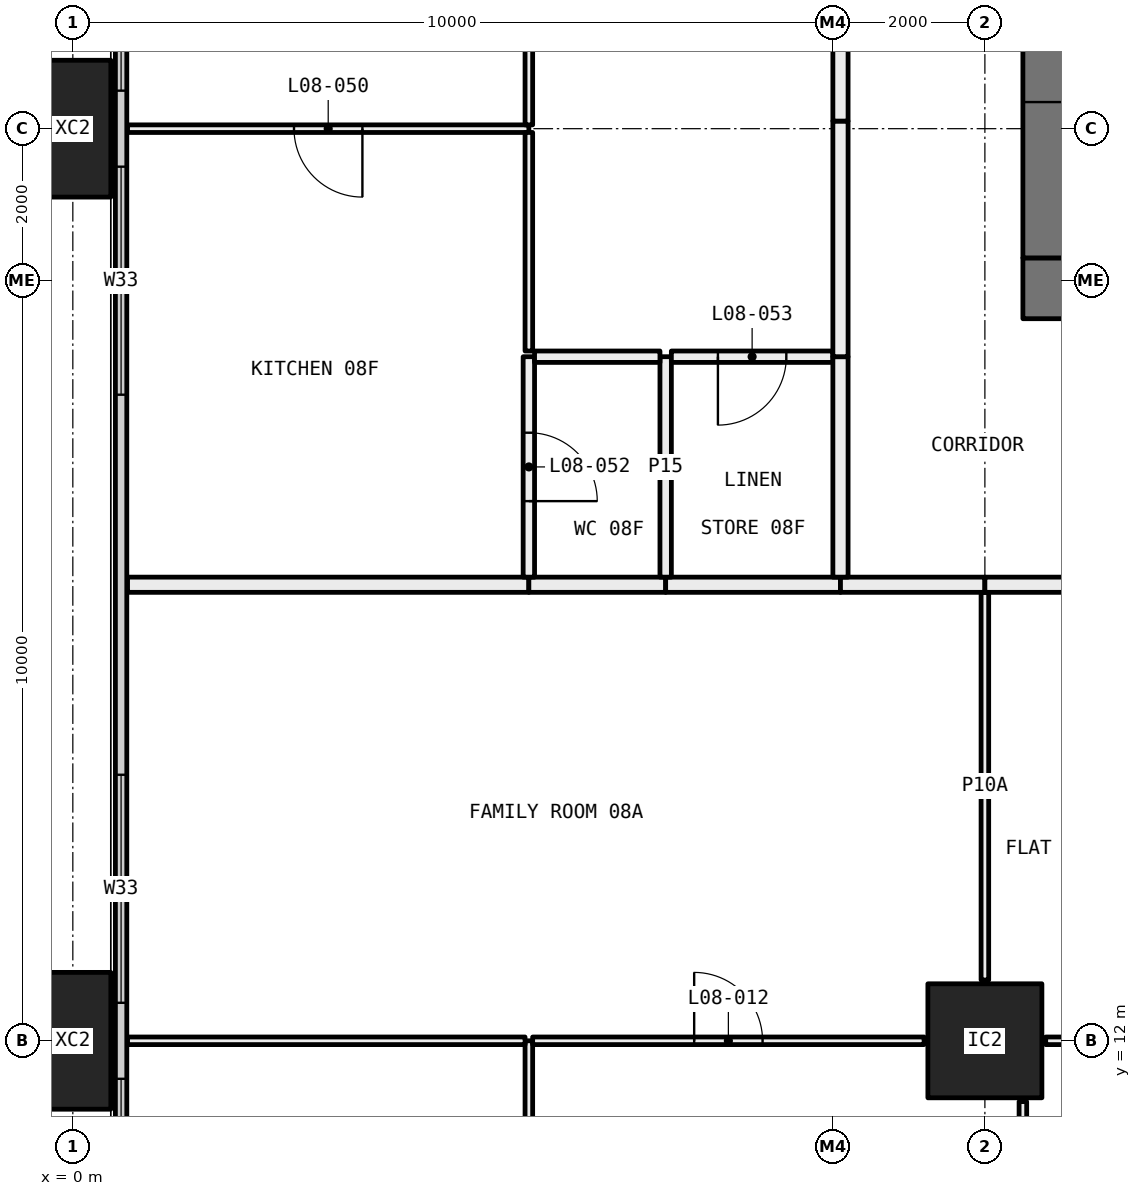
"""IFC4 building model, lengths in metres.
Left out: names, types, materials, properties, quantities, classifications, styles, units other than length and angle.
Written with IfcOpenShell. Run it as: python <this file> out.ifc"""

import sys

from ifc_helpers import new_model, si_unit, direction, frame, frame_2d, origin, origin_2d, place, context, subcontext, project, spatial, rectangle, hollow_rectangle, extrude, element, fill, save


model = new_model("IFC4")
c1 = context("Model", 3, precision=1e-05, world=origin(), true_north=direction((0.0, 1.0)))
c2 = subcontext(c1, "Body", "Model", "MODEL_VIEW")
j1 = project(units=[si_unit("LENGTHUNIT", "METRE"), si_unit("PLANEANGLEUNIT", "RADIAN")], contexts=[c1])
p1 = place(None, origin())
s1 = spatial("IfcSite", under=j1, at=p1, CompositionType="ELEMENT")
p2 = place(p1, origin())
s2 = spatial("IfcBuilding", under=s1, at=p2, CompositionType="ELEMENT")
p3 = place(p2, frame((0.0, 0.0, 40.35)))
s3 = spatial("IfcBuildingStorey", under=s2, at=p3, CompositionType="ELEMENT", Elevation=40.35)
for number, where, z_axis, x_axis in (
    (1, (0.0, 12.0, -0.4), (0.0, 0.0, 1.0), (0.0, 1.0, 0.0)),
    (2, (0.0, 24.0, -0.4), (0.0, 0.0, 1.0), (0.0, 1.0, 0.0)),
):
    element("IfcColumn", number, at=place(p3, frame(where, z_axis=z_axis, x_axis=x_axis)), inside=s3, PredefinedType="COLUMN", context=c2, shape_type="SweptSolid", body=[
        extrude(hollow_rectangle(XDim=1.8, YDim=1.0, WallThickness=0.07, at=origin_2d()), origin(), (0.0, 0.0, 1.0), 3.45),
    ])
p4 = place(p3, frame((12.0, 12.0, 0.0), z_axis=(0.0, 0.0, 1.0), x_axis=(1.0, 0.0, 0.0)))
e3 = element("IfcColumn", 3, at=p4, inside=s3, PredefinedType="COLUMN", context=c2, shape_type="SweptSolid", body=[
    extrude(hollow_rectangle(XDim=1.5, YDim=1.5, WallThickness=0.065, at=origin_2d()), origin(), (0.0, 0.0, 1.0), 3.05),
])
p5 = place(p3, frame((0.635, 6.71, 0.0), z_axis=(0.0, 0.0, 1.0), x_axis=(0.0, 1.0, 0.0)))
e4 = element("IfcWall", 4, at=p5, inside=s3, PredefinedType="ELEMENTEDWALL", context=c2, shape_type="SweptSolid", body=[
    extrude(rectangle(XDim=34.58, YDim=0.15, at=frame_2d((17.29, 0.0))), origin(), (0.0, 0.0, 1.0), 3.05),
])
p6 = place(p5, frame((0.29, 0.0, 0.45)))
e5 = element("IfcOpeningElement", 5, at=p6, cuts=e4, PredefinedType="OPENING", context=c2, shape_type="SweptSolid", body=[
    extrude(rectangle(XDim=4.5, YDim=2.55, at=frame_2d((2.25, 1.275))), frame((0.0, 0.085, 0.0), z_axis=(0.0, -1.0, 0.0), x_axis=(1.0, 0.0, 0.0)), (0.0, 0.0, 1.0), 0.17),
])
p7 = place(p5, frame((5.79, 0.0, 0.45)))
e6 = element("IfcOpeningElement", 6, at=p7, cuts=e4, PredefinedType="OPENING", context=c2, shape_type="SweptSolid", body=[
    extrude(rectangle(XDim=3.0, YDim=2.55, at=frame_2d((1.5, 1.275))), frame((0.0, 0.085, 0.0), z_axis=(0.0, -1.0, 0.0), x_axis=(1.0, 0.0, 0.0)), (0.0, 0.0, 1.0), 0.17),
])
p8 = place(p5, frame((13.79, 0.0, 0.45)))
e7 = element("IfcOpeningElement", 7, at=p8, cuts=e4, PredefinedType="OPENING", context=c2, shape_type="SweptSolid", body=[
    extrude(rectangle(XDim=3.0, YDim=2.55, at=frame_2d((1.5, 1.275))), frame((0.0, 0.085, 0.0), z_axis=(0.0, -1.0, 0.0), x_axis=(1.0, 0.0, 0.0)), (0.0, 0.0, 1.0), 0.17),
])
p9 = place(p5, frame((17.79, 0.0, 0.45)))
e8 = element("IfcOpeningElement", 8, at=p9, cuts=e4, PredefinedType="OPENING", context=c2, shape_type="SweptSolid", body=[
    extrude(rectangle(XDim=3.0, YDim=2.55, at=frame_2d((1.5, 1.275))), frame((0.0, 0.085, 0.0), z_axis=(0.0, -1.0, 0.0), x_axis=(1.0, 0.0, 0.0)), (0.0, 0.0, 1.0), 0.17),
])
p10 = place(p5, frame((26.79, 0.0, 0.45)))
e9 = element("IfcOpeningElement", 9, at=p10, cuts=e4, PredefinedType="OPENING", context=c2, shape_type="SweptSolid", body=[
    extrude(rectangle(XDim=2.0, YDim=2.55, at=frame_2d((1.0, 1.275))), frame((0.0, 0.085, 0.0), z_axis=(0.0, -1.0, 0.0), x_axis=(1.0, 0.0, 0.0)), (0.0, 0.0, 1.0), 0.17),
])
p11 = place(p5, frame((29.79, 0.0, 0.45)))
e10 = element("IfcOpeningElement", 10, at=p11, cuts=e4, PredefinedType="OPENING", context=c2, shape_type="SweptSolid", body=[
    extrude(rectangle(XDim=4.5, YDim=2.55, at=frame_2d((2.25, 1.275))), frame((0.0, 0.085, 0.0), z_axis=(0.0, -1.0, 0.0), x_axis=(1.0, 0.0, 0.0)), (0.0, 0.0, 1.0), 0.17),
])
p12 = place(p3, frame((6.0, 6.72, 0.0), z_axis=(0.0, 0.0, 1.0), x_axis=(0.0, 1.0, 0.0)))
e11 = element("IfcWall", 11, at=p12, inside=s3, PredefinedType="PARTITIONING", context=c2, shape_type="SweptSolid", body=[
    extrude(rectangle(XDim=5.28, YDim=0.1, at=frame_2d((2.64, 0.0))), origin(), (0.0, 0.0, 1.0), 2.45),
])
p13 = place(p12, frame((2.19, 0.0, 0.0)))
e12 = element("IfcOpeningElement", 12, at=p13, cuts=e11, PredefinedType="OPENING", context=c2, shape_type="SweptSolid", body=[
    extrude(rectangle(XDim=0.9, YDim=2.1, at=frame_2d((0.45, 1.05))), frame((0.0, 0.06, 0.0), z_axis=(0.0, -1.0, 0.0), x_axis=(1.0, 0.0, 0.0)), (0.0, 0.0, 1.0), 0.12),
])
p14 = place(p3, frame((5.95, 12.0, 0.0), z_axis=(0.0, 0.0, 1.0), x_axis=(-1.0, 0.0, 0.0)))
e13 = element("IfcWall", 13, at=p14, inside=s3, PredefinedType="PARTITIONING", context=c2, shape_type="SweptSolid", body=[
    extrude(rectangle(XDim=5.23, YDim=0.1, at=frame_2d((2.615, 0.0))), origin(), (0.0, 0.0, 1.0), 2.45),
])
p15 = place(p3, frame((12.5, 6.05, 0.0), z_axis=(0.0, 0.0, 1.0), x_axis=(0.0, 1.0, 0.0)))
e14 = element("IfcWall", 14, at=p15, inside=s3, PredefinedType="PARTITIONING", context=c2, shape_type="SweptSolid", body=[
    extrude(rectangle(XDim=5.15, YDim=0.1, at=frame_2d((2.575, 0.0))), origin(), (0.0, 0.0, 1.0), 3.05),
])
p16 = place(p15, frame((2.125, 0.0, 0.0)))
e15 = element("IfcOpeningElement", 15, at=p16, cuts=e14, PredefinedType="OPENING", context=c2, shape_type="SweptSolid", body=[
    extrude(rectangle(XDim=0.9, YDim=2.1, at=frame_2d((0.45, 1.05))), frame((0.0, 0.06, 0.0), z_axis=(0.0, -1.0, 0.0), x_axis=(1.0, 0.0, 0.0)), (0.0, 0.0, 1.0), 0.12),
])
p17 = place(p3, frame((11.2, 12.0, 0.0), z_axis=(0.0, 0.0, 1.0), x_axis=(-1.0, 0.0, 0.0)))
e16 = element("IfcWall", 16, at=p17, inside=s3, PredefinedType="PARTITIONING", context=c2, shape_type="SweptSolid", body=[
    extrude(rectangle(XDim=5.15, YDim=0.1, at=frame_2d((2.575, 0.0))), origin(), (0.0, 0.0, 1.0), 2.45),
])
p18 = place(p17, frame((2.125, 0.0, 0.0)))
e17 = element("IfcOpeningElement", 17, at=p18, cuts=e16, PredefinedType="OPENING", context=c2, shape_type="SweptSolid", body=[
    extrude(rectangle(XDim=0.9, YDim=2.1, at=frame_2d((0.45, 1.05))), frame((0.0, 0.06, 0.0), z_axis=(0.0, -1.0, 0.0), x_axis=(1.0, 0.0, 0.0)), (0.0, 0.0, 1.0), 0.12),
])
p19 = place(p3, frame((16.5, 12.0, 0.0), z_axis=(0.0, 0.0, 1.0), x_axis=(-1.0, 0.0, 0.0)))
e18 = element("IfcWall", 18, at=p19, inside=s3, PredefinedType="PARTITIONING", context=c2, shape_type="SweptSolid", body=[
    extrude(rectangle(XDim=3.7, YDim=0.1, at=frame_2d((1.85, 0.0))), origin(), (0.0, 0.0, 1.0), 2.45),
])
p20 = place(p19, frame((1.4, 0.0, 0.0)))
e19 = element("IfcOpeningElement", 19, at=p20, cuts=e18, PredefinedType="OPENING", context=c2, shape_type="SweptSolid", body=[
    extrude(rectangle(XDim=0.9, YDim=2.1, at=frame_2d((0.45, 1.05))), frame((0.0, 0.06, 0.0), z_axis=(0.0, -1.0, 0.0), x_axis=(1.0, 0.0, 0.0)), (0.0, 0.0, 1.0), 0.12),
])
p21 = place(p3, frame((12.0, 12.8, 0.0), z_axis=(0.0, 0.0, 1.0), x_axis=(0.0, 1.0, 0.0)))
e20 = element("IfcWall", 20, at=p21, inside=s3, PredefinedType="PARTITIONING", context=c2, shape_type="SweptSolid", body=[
    extrude(rectangle(XDim=5.1, YDim=0.1, at=frame_2d((2.55, 0.0))), origin(), (0.0, 0.0, 1.0), 3.05),
])
p22 = place(p3, frame((6.0, 18.0, 0.0), z_axis=(0.0, 0.0, 1.0), x_axis=(-1.0, 0.0, 0.0)))
e21 = element("IfcWall", 21, at=p22, inside=s3, PredefinedType="PARTITIONING", context=c2, shape_type="SweptSolid", body=[
    extrude(rectangle(XDim=5.28, YDim=0.2, at=frame_2d((2.64, 0.0))), origin(), (0.0, 0.0, 1.0), 3.05),
])
p23 = place(p3, frame((7.8, 18.0, 0.0), z_axis=(0.0, 0.0, 1.0), x_axis=(-1.0, 0.0, 0.0)))
e22 = element("IfcWall", 22, at=p23, inside=s3, PredefinedType="PARTITIONING", context=c2, shape_type="SweptSolid", body=[
    extrude(rectangle(XDim=1.8, YDim=0.2, at=frame_2d((0.9, 0.0))), origin(), (0.0, 0.0, 1.0), 3.05),
])
p24 = place(p3, frame((10.1, 18.0, 0.0), z_axis=(0.0, 0.0, 1.0), x_axis=(-1.0, 0.0, 0.0)))
e23 = element("IfcWall", 23, at=p24, inside=s3, PredefinedType="PARTITIONING", context=c2, shape_type="SweptSolid", body=[
    extrude(rectangle(XDim=2.3, YDim=0.2, at=frame_2d((1.15, 0.0))), origin(), (0.0, 0.0, 1.0), 3.05),
])
p25 = place(p3, frame((12.0, 18.0, 0.0), z_axis=(0.0, 0.0, 1.0), x_axis=(-1.0, 0.0, 0.0)))
e24 = element("IfcWall", 24, at=p25, inside=s3, PredefinedType="PARTITIONING", context=c2, shape_type="SweptSolid", body=[
    extrude(rectangle(XDim=1.9, YDim=0.2, at=frame_2d((0.95, 0.0))), origin(), (0.0, 0.0, 1.0), 3.05),
])
p26 = place(p3, frame((16.5, 18.0, 0.0), z_axis=(0.0, 0.0, 1.0), x_axis=(-1.0, 0.0, 0.0)))
e25 = element("IfcWall", 25, at=p26, inside=s3, PredefinedType="PARTITIONING", context=c2, shape_type="SweptSolid", body=[
    extrude(rectangle(XDim=4.5, YDim=0.2, at=frame_2d((2.25, 0.0))), origin(), (0.0, 0.0, 1.0), 3.05),
])
p27 = place(p26, frame((1.75, 0.0, 0.0)))
e26 = element("IfcOpeningElement", 26, at=p27, cuts=e25, PredefinedType="OPENING", context=c2, shape_type="SweptSolid", body=[
    extrude(rectangle(XDim=1.0, YDim=2.1, at=frame_2d((0.5, 1.05))), frame((0.0, 0.11, 0.0), z_axis=(0.0, -1.0, 0.0), x_axis=(1.0, 0.0, 0.0)), (0.0, 0.0, 1.0), 0.22),
])
p28 = place(p3, frame((6.0, 24.0, 0.0), z_axis=(0.0, 0.0, 1.0), x_axis=(-1.0, 0.0, 0.0)))
e27 = element("IfcWall", 27, at=p28, inside=s3, PredefinedType="PARTITIONING", context=c2, shape_type="SweptSolid", body=[
    extrude(rectangle(XDim=5.28, YDim=0.1, at=frame_2d((2.64, 0.0))), origin(), (0.0, 0.0, 1.0), 2.45),
])
p29 = place(p28, frame((2.19, 0.0, 0.0)))
e28 = element("IfcOpeningElement", 28, at=p29, cuts=e27, PredefinedType="OPENING", context=c2, shape_type="SweptSolid", body=[
    extrude(rectangle(XDim=0.9, YDim=2.1, at=frame_2d((0.45, 1.05))), frame((0.0, 0.06, 0.0), z_axis=(0.0, -1.0, 0.0), x_axis=(1.0, 0.0, 0.0)), (0.0, 0.0, 1.0), 0.12),
])
p30 = place(p3, frame((6.0, 18.1, 0.0), z_axis=(0.0, 0.0, 1.0), x_axis=(0.0, 1.0, 0.0)))
e29 = element("IfcWall", 29, at=p30, inside=s3, PredefinedType="PARTITIONING", context=c2, shape_type="SweptSolid", body=[
    extrude(rectangle(XDim=2.9, YDim=0.15, at=frame_2d((1.45, 0.0))), origin(), (0.0, 0.0, 1.0), 3.05),
])
p31 = place(p30, frame((1.0, 0.0, 0.0)))
e30 = element("IfcOpeningElement", 30, at=p31, cuts=e29, PredefinedType="OPENING", context=c2, shape_type="SweptSolid", body=[
    extrude(rectangle(XDim=0.9, YDim=2.1, at=frame_2d((0.45, 1.05))), frame((0.0, 0.085, 0.0), z_axis=(0.0, -1.0, 0.0), x_axis=(1.0, 0.0, 0.0)), (0.0, 0.0, 1.0), 0.17),
])
p32 = place(p3, frame((6.0, 21.075, 0.0), z_axis=(0.0, 0.0, 1.0), x_axis=(0.0, 1.0, 0.0)))
e31 = element("IfcWall", 31, at=p32, inside=s3, PredefinedType="PARTITIONING", context=c2, shape_type="SweptSolid", body=[
    extrude(rectangle(XDim=2.875, YDim=0.1, at=frame_2d((1.438, 0.0))), origin(), (0.0, 0.0, 1.0), 2.45),
])
p33 = place(p3, frame((6.0, 24.05, 0.0), z_axis=(0.0, 0.0, 1.0), x_axis=(0.0, 1.0, 0.0)))
e32 = element("IfcWall", 32, at=p33, inside=s3, PredefinedType="PARTITIONING", context=c2, shape_type="SweptSolid", body=[
    extrude(rectangle(XDim=8.95, YDim=0.1, at=frame_2d((4.475, 0.0))), origin(), (0.0, 0.0, 1.0), 2.45),
])
p34 = place(p3, frame((7.8, 18.1, 0.0), z_axis=(0.0, 0.0, 1.0), x_axis=(0.0, 1.0, 0.0)))
e33 = element("IfcWall", 33, at=p34, inside=s3, PredefinedType="PARTITIONING", context=c2, shape_type="SweptSolid", body=[
    extrude(rectangle(XDim=2.9, YDim=0.15, at=frame_2d((1.45, 0.0))), origin(), (0.0, 0.0, 1.0), 3.05),
])
p35 = place(p3, frame((7.725, 21.0, 0.0), z_axis=(0.0, 0.0, 1.0), x_axis=(-1.0, 0.0, 0.0)))
e34 = element("IfcWall", 34, at=p35, inside=s3, PredefinedType="PARTITIONING", context=c2, shape_type="SweptSolid", body=[
    extrude(rectangle(XDim=1.65, YDim=0.15, at=frame_2d((0.825, 0.0))), origin(), (0.0, 0.0, 1.0), 3.05),
])
p36 = place(p3, frame((10.0, 21.0, 0.0), z_axis=(0.0, 0.0, 1.0), x_axis=(-1.0, 0.0, 0.0)))
e35 = element("IfcWall", 35, at=p36, inside=s3, PredefinedType="PARTITIONING", context=c2, shape_type="SweptSolid", body=[
    extrude(rectangle(XDim=2.125, YDim=0.15, at=frame_2d((1.062, 0.0))), origin(), (0.0, 0.0, 1.0), 3.05),
])
p37 = place(p36, frame((0.613, 0.0, 0.0)))
e36 = element("IfcOpeningElement", 36, at=p37, cuts=e35, PredefinedType="OPENING", context=c2, shape_type="SweptSolid", body=[
    extrude(rectangle(XDim=0.9, YDim=2.1, at=frame_2d((0.45, 1.05))), frame((0.0, 0.085, 0.0), z_axis=(0.0, -1.0, 0.0), x_axis=(1.0, 0.0, 0.0)), (0.0, 0.0, 1.0), 0.17),
])
p38 = place(p3, frame((10.1, 18.1, 0.0), z_axis=(0.0, 0.0, 1.0), x_axis=(0.0, 1.0, 0.0)))
e37 = element("IfcWall", 37, at=p38, inside=s3, PredefinedType="PARTITIONING", context=c2, shape_type="SweptSolid", body=[
    extrude(rectangle(XDim=2.9, YDim=0.2, at=frame_2d((1.45, 0.0))), origin(), (0.0, 0.0, 1.0), 3.05),
])
p39 = place(p3, frame((10.1, 21.0, 0.0), z_axis=(0.0, 0.0, 1.0), x_axis=(0.0, 1.0, 0.0)))
e38 = element("IfcWall", 38, at=p39, inside=s3, PredefinedType="PARTITIONING", context=c2, shape_type="SweptSolid", body=[
    extrude(rectangle(XDim=3.1, YDim=0.2, at=frame_2d((1.55, 0.0))), origin(), (0.0, 0.0, 1.0), 2.45),
])
p40 = place(p3, frame((10.1, 24.1, 0.0), z_axis=(0.0, 0.0, 1.0), x_axis=(0.0, 1.0, 0.0)))
e39 = element("IfcWall", 39, at=p40, inside=s3, PredefinedType="PARTITIONING", context=c2, shape_type="SweptSolid", body=[
    extrude(rectangle(XDim=8.9, YDim=0.2, at=frame_2d((4.45, 0.0))), origin(), (0.0, 0.0, 1.0), 3.05),
])
p41 = place(p3, frame((12.5, 21.9, 0.0), z_axis=(0.0, 0.0, 1.0), x_axis=(1.0, 0.0, 0.0)))
e40 = element("IfcWall", 40, at=p41, inside=s3, PredefinedType="SHEAR", context=c2, shape_type="SweptSolid", body=[
    extrude(rectangle(XDim=11.0, YDim=0.8, at=frame_2d((5.5, 0.0))), origin(), (0.0, 0.0, 1.0), 3.05),
])
p42 = place(p3, frame((12.9, 22.3, 0.0), z_axis=(0.0, 0.0, 1.0), x_axis=(0.0, 1.0, 0.0)))
e41 = element("IfcWall", 41, at=p42, inside=s3, PredefinedType="SHEAR", context=c2, shape_type="SweptSolid", body=[
    extrude(rectangle(XDim=15.4, YDim=0.8, at=frame_2d((7.7, 0.0))), origin(), (0.0, 0.0, 1.0), 3.05),
])
p43 = place(p42, frame((8.15, 0.0, 0.0)))
e42 = element("IfcOpeningElement", 42, at=p43, cuts=e41, PredefinedType="OPENING", context=c2, shape_type="SweptSolid", body=[
    extrude(rectangle(XDim=1.6, YDim=2.1, at=frame_2d((0.8, 1.05))), frame((0.0, 0.41, 0.0), z_axis=(0.0, -1.0, 0.0), x_axis=(1.0, 0.0, 0.0)), (0.0, 0.0, 1.0), 0.82),
])
p44 = place(p42, frame((2.05, 0.0, 0.0)))
e43 = element("IfcOpeningElement", 43, at=p44, cuts=e41, PredefinedType="OPENING", context=c2, shape_type="SweptSolid", body=[
    extrude(rectangle(XDim=1.0, YDim=2.1, at=frame_2d((0.5, 1.05))), frame((0.0, 0.41, 0.0), z_axis=(0.0, -1.0, 0.0), x_axis=(1.0, 0.0, 0.0)), (0.0, 0.0, 1.0), 0.82),
])
p45 = place(p6, origin())
e44 = element("IfcWindow", 44, at=p45, inside=s3, PartitioningType="SINGLE_PANEL", PredefinedType="WINDOW", context=c2, shape_type="SweptSolid", body=[
    extrude(rectangle(XDim=4.5, YDim=2.55, at=frame_2d((2.25, 1.275))), frame((0.0, 0.03, 0.0), z_axis=(0.0, -1.0, 0.0), x_axis=(1.0, 0.0, 0.0)), (0.0, 0.0, 1.0), 0.06),
])
fill(e5, e44)
p46 = place(p7, origin())
e45 = element("IfcWindow", 45, at=p46, inside=s3, PartitioningType="SINGLE_PANEL", PredefinedType="WINDOW", context=c2, shape_type="SweptSolid", body=[
    extrude(rectangle(XDim=3.0, YDim=2.55, at=frame_2d((1.5, 1.275))), frame((0.0, 0.03, 0.0), z_axis=(0.0, -1.0, 0.0), x_axis=(1.0, 0.0, 0.0)), (0.0, 0.0, 1.0), 0.06),
])
fill(e6, e45)
p47 = place(p8, origin())
e46 = element("IfcWindow", 46, at=p47, inside=s3, PartitioningType="SINGLE_PANEL", PredefinedType="WINDOW", context=c2, shape_type="SweptSolid", body=[
    extrude(rectangle(XDim=3.0, YDim=2.55, at=frame_2d((1.5, 1.275))), frame((0.0, 0.03, 0.0), z_axis=(0.0, -1.0, 0.0), x_axis=(1.0, 0.0, 0.0)), (0.0, 0.0, 1.0), 0.06),
])
fill(e7, e46)
p48 = place(p9, origin())
e47 = element("IfcWindow", 47, at=p48, inside=s3, PartitioningType="SINGLE_PANEL", PredefinedType="WINDOW", context=c2, shape_type="SweptSolid", body=[
    extrude(rectangle(XDim=3.0, YDim=2.55, at=frame_2d((1.5, 1.275))), frame((0.0, 0.03, 0.0), z_axis=(0.0, -1.0, 0.0), x_axis=(1.0, 0.0, 0.0)), (0.0, 0.0, 1.0), 0.06),
])
fill(e8, e47)
p49 = place(p18, frame((0.9, 0.0, 0.0), x_axis=(-1.0, 0.0, 0.0)))
e48 = element("IfcDoor", 48, at=p49, inside=s3, OperationType="SINGLE_SWING_RIGHT", PredefinedType="DOOR", context=c2, shape_type="SweptSolid", body=[
    extrude(rectangle(XDim=0.9, YDim=2.1, at=frame_2d((0.45, 1.05))), frame((0.0, 0.025, 0.0), z_axis=(0.0, -1.0, 0.0), x_axis=(1.0, 0.0, 0.0)), (0.0, 0.0, 1.0), 0.05),
])
fill(e17, e48)
p50 = place(p29, origin())
e49 = element("IfcDoor", 49, at=p50, inside=s3, OperationType="SINGLE_SWING_RIGHT", PredefinedType="DOOR", context=c2, shape_type="SweptSolid", body=[
    extrude(rectangle(XDim=0.9, YDim=2.1, at=frame_2d((0.45, 1.05))), frame((0.0, 0.025, 0.0), z_axis=(0.0, -1.0, 0.0), x_axis=(1.0, 0.0, 0.0)), (0.0, 0.0, 1.0), 0.05),
])
fill(e28, e49)
p51 = place(p31, frame((0.9, 0.0, 0.0), x_axis=(-1.0, 0.0, 0.0)))
e50 = element("IfcDoor", 50, at=p51, inside=s3, OperationType="SINGLE_SWING_LEFT", PredefinedType="DOOR", context=c2, shape_type="SweptSolid", body=[
    extrude(rectangle(XDim=0.9, YDim=2.1, at=frame_2d((0.45, 1.05))), frame((0.0, 0.025, 0.0), z_axis=(0.0, -1.0, 0.0), x_axis=(1.0, 0.0, 0.0)), (0.0, 0.0, 1.0), 0.05),
])
fill(e30, e50)
p52 = place(p37, origin())
e51 = element("IfcDoor", 51, at=p52, inside=s3, OperationType="SINGLE_SWING_LEFT", PredefinedType="DOOR", context=c2, shape_type="SweptSolid", body=[
    extrude(rectangle(XDim=0.9, YDim=2.1, at=frame_2d((0.45, 1.05))), frame((0.0, 0.025, 0.0), z_axis=(0.0, -1.0, 0.0), x_axis=(1.0, 0.0, 0.0)), (0.0, 0.0, 1.0), 0.05),
])
fill(e36, e51)
p53 = place(p44, frame((1.0, 0.0, 0.0), x_axis=(-1.0, 0.0, 0.0)))
e52 = element("IfcDoor", 52, at=p53, inside=s3, OperationType="SINGLE_SWING_RIGHT", PredefinedType="DOOR", context=c2, shape_type="SweptSolid", body=[
    extrude(rectangle(XDim=1.0, YDim=2.1, at=frame_2d((0.5, 1.05))), frame((0.0, 0.025, 0.0), z_axis=(0.0, -1.0, 0.0), x_axis=(1.0, 0.0, 0.0)), (0.0, 0.0, 1.0), 0.05),
])
fill(e43, e52)
save(model, sys.argv[1])
